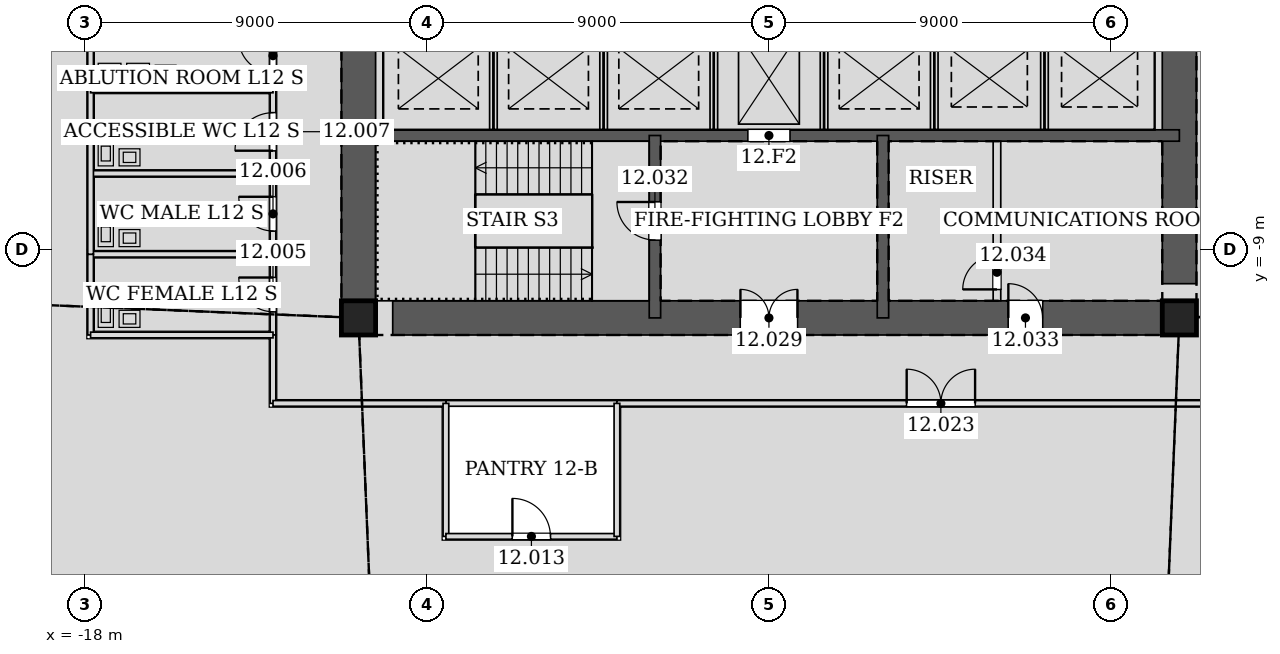
"""IFC4 building model, lengths in metres.
Left out: names, types, materials, properties, quantities, classifications, styles, units other than length and angle.
Written with IfcOpenShell. Run it as: python <this file> out.ifc"""

import sys

from ifc_helpers import new_model, si_unit, direction, frame, frame_2d, origin, origin_2d, place, context, subcontext, project, spatial, rectangle, hollow_rectangle, extrude, element, fill, save


model = new_model("IFC4")
c1 = context("Model", 3, precision=1e-05, world=origin(), true_north=direction((0.0, 1.0)))
c2 = subcontext(c1, "Body", "Model", "MODEL_VIEW")
j1 = project(units=[si_unit("LENGTHUNIT", "METRE"), si_unit("PLANEANGLEUNIT", "RADIAN")], contexts=[c1])
p1 = place(None, origin())
s1 = spatial("IfcSite", under=j1, at=p1, CompositionType="ELEMENT")
p2 = place(p1, origin())
s2 = spatial("IfcBuilding", under=s1, at=p2, CompositionType="ELEMENT")
p3 = place(p2, frame((0.0, 0.0, 58.2)))
s3 = spatial("IfcBuildingStorey", under=s2, at=p3, CompositionType="ELEMENT", Elevation=58.2)
for number, where, z_axis, x_axis in (
    (1, (-10.8, -10.8, 0.0), (0.0, 0.0, 1.0), (1.0, 0.0, 0.0)),
    (2, (10.8, -10.8, 0.0), (0.0, 0.0, 1.0), (1.0, 0.0, 0.0)),
):
    element("IfcColumn", number, at=place(p3, frame(where, z_axis=z_axis, x_axis=x_axis)), inside=s3, PredefinedType="COLUMN", context=c2, shape_type="SweptSolid", body=[
        extrude(hollow_rectangle(XDim=0.9, YDim=0.9, WallThickness=0.06, at=origin_2d()), origin(), (0.0, 0.0, 1.0), 4.2),
    ])
p4 = place(p3, frame((-10.8, -10.8, 0.0), z_axis=(0.0, 0.0, 1.0), x_axis=(1.0, 0.0, 0.0)))
e3 = element("IfcWall", 3, at=p4, inside=s3, PredefinedType="SOLIDWALL", context=c2, shape_type="SweptSolid", body=[
    extrude(rectangle(XDim=21.6, YDim=0.9, at=frame_2d((10.8, 0.0))), origin(), (0.0, 0.0, 1.0), 4.2),
])
p5 = place(p4, frame((10.05, 0.0, 0.0)))
e4 = element("IfcOpeningElement", 4, at=p5, cuts=e3, PredefinedType="OPENING", context=c2, shape_type="SweptSolid", body=[
    extrude(rectangle(XDim=1.5, YDim=2.1, at=frame_2d((0.75, 1.05))), frame((0.0, 0.46, 0.0), z_axis=(0.0, -1.0, 0.0), x_axis=(1.0, 0.0, 0.0)), (0.0, 0.0, 1.0), 0.92),
])
p6 = place(p4, frame((17.1, 0.0, 0.0)))
e5 = element("IfcOpeningElement", 5, at=p6, cuts=e3, PredefinedType="OPENING", context=c2, shape_type="SweptSolid", body=[
    extrude(rectangle(XDim=0.9, YDim=2.1, at=frame_2d((0.45, 1.05))), frame((0.0, 0.46, 0.0), z_axis=(0.0, -1.0, 0.0), x_axis=(1.0, 0.0, 0.0)), (0.0, 0.0, 1.0), 0.92),
])
p7 = place(p3, frame((10.8, -10.8, 0.0), z_axis=(0.0, 0.0, 1.0), x_axis=(0.0, 1.0, 0.0)))
e6 = element("IfcWall", 6, at=p7, inside=s3, PredefinedType="SOLIDWALL", context=c2, shape_type="SweptSolid", body=[
    extrude(rectangle(XDim=21.6, YDim=0.9, at=frame_2d((10.8, 0.0))), origin(), (0.0, 0.0, 1.0), 4.2),
])
p8 = place(p7, frame((11.7, 0.0, 0.0)))
e7 = element("IfcOpeningElement", 7, at=p8, cuts=e6, PredefinedType="OPENING", context=c2, shape_type="SweptSolid", body=[
    extrude(rectangle(XDim=1.2, YDim=2.1, at=frame_2d((0.6, 1.05))), frame((0.0, 0.46, 0.0), z_axis=(0.0, -1.0, 0.0), x_axis=(1.0, 0.0, 0.0)), (0.0, 0.0, 1.0), 0.92),
])
p9 = place(p7, frame((8.7, 0.0, 0.0)))
e8 = element("IfcOpeningElement", 8, at=p9, cuts=e6, PredefinedType="OPENING", context=c2, shape_type="SweptSolid", body=[
    extrude(rectangle(XDim=1.2, YDim=2.1, at=frame_2d((0.6, 1.05))), frame((0.0, 0.46, 0.0), z_axis=(0.0, -1.0, 0.0), x_axis=(1.0, 0.0, 0.0)), (0.0, 0.0, 1.0), 0.92),
])
p10 = place(p3, frame((-10.8, 10.8, 0.0), z_axis=(0.0, 0.0, 1.0), x_axis=(0.0, -1.0, 0.0)))
e9 = element("IfcWall", 9, at=p10, inside=s3, PredefinedType="SOLIDWALL", context=c2, shape_type="SweptSolid", body=[
    extrude(rectangle(XDim=21.6, YDim=0.9, at=frame_2d((10.8, 0.0))), origin(), (0.0, 0.0, 1.0), 4.2),
])
p11 = place(p10, frame((8.7, 0.0, 0.0)))
e10 = element("IfcOpeningElement", 10, at=p11, cuts=e9, PredefinedType="OPENING", context=c2, shape_type="SweptSolid", body=[
    extrude(rectangle(XDim=1.2, YDim=2.1, at=frame_2d((0.6, 1.05))), frame((0.0, 0.46, 0.0), z_axis=(0.0, -1.0, 0.0), x_axis=(1.0, 0.0, 0.0)), (0.0, 0.0, 1.0), 0.92),
])
p12 = place(p10, frame((11.7, 0.0, 0.0)))
e11 = element("IfcOpeningElement", 11, at=p12, cuts=e9, PredefinedType="OPENING", context=c2, shape_type="SweptSolid", body=[
    extrude(rectangle(XDim=1.2, YDim=2.1, at=frame_2d((0.6, 1.05))), frame((0.0, 0.46, 0.0), z_axis=(0.0, -1.0, 0.0), x_axis=(1.0, 0.0, 0.0)), (0.0, 0.0, 1.0), 0.92),
])
p13 = place(p3, frame((-10.8, -6.0, 0.0), z_axis=(0.0, 0.0, 1.0), x_axis=(1.0, 0.0, 0.0)))
e12 = element("IfcWall", 12, at=p13, inside=s3, PredefinedType="SOLIDWALL", context=c2, shape_type="SweptSolid", body=[
    extrude(rectangle(XDim=21.6, YDim=0.3, at=frame_2d((10.8, 0.0))), origin(), (0.0, 0.0, 1.0), 4.2),
])
p14 = place(p13, frame((10.25, 0.0, 0.0)))
e13 = element("IfcOpeningElement", 13, at=p14, cuts=e12, PredefinedType="OPENING", context=c2, shape_type="SweptSolid", body=[
    extrude(rectangle(XDim=1.1, YDim=2.1, at=frame_2d((0.55, 1.05))), frame((0.0, 0.16, 0.0), z_axis=(0.0, -1.0, 0.0), x_axis=(1.0, 0.0, 0.0)), (0.0, 0.0, 1.0), 0.32),
])
p15 = place(p3, frame((-3.0, -6.0, 0.0), z_axis=(0.0, 0.0, 1.0), x_axis=(0.0, -1.0, 0.0)))
e14 = element("IfcWall", 14, at=p15, inside=s3, PredefinedType="SOLIDWALL", context=c2, shape_type="SweptSolid", body=[
    extrude(rectangle(XDim=4.8, YDim=0.3, at=frame_2d((2.4, 0.0))), origin(), (0.0, 0.0, 1.0), 4.2),
])
p16 = place(p15, frame((1.75, 0.0, 0.0)))
e15 = element("IfcOpeningElement", 15, at=p16, cuts=e14, PredefinedType="OPENING", context=c2, shape_type="SweptSolid", body=[
    extrude(rectangle(XDim=1.0, YDim=2.1, at=frame_2d((0.5, 1.05))), frame((0.0, 0.16, 0.0), z_axis=(0.0, -1.0, 0.0), x_axis=(1.0, 0.0, 0.0)), (0.0, 0.0, 1.0), 0.32),
])
p17 = place(p3, frame((3.0, -6.0, 0.0), z_axis=(0.0, 0.0, 1.0), x_axis=(0.0, -1.0, 0.0)))
e16 = element("IfcWall", 16, at=p17, inside=s3, PredefinedType="SOLIDWALL", context=c2, shape_type="SweptSolid", body=[
    extrude(rectangle(XDim=4.8, YDim=0.3, at=frame_2d((2.4, 0.0))), origin(), (0.0, 0.0, 1.0), 4.2),
])
p18 = place(p3, frame((-13.05, -9.124, 0.0), z_axis=(0.0, 0.0, 1.0), x_axis=(0.0, -1.0, 0.0)))
e17 = element("IfcWall", 17, at=p18, inside=s3, PredefinedType="PARTITIONING", context=c2, shape_type="SweptSolid", body=[
    extrude(rectangle(XDim=2.127, YDim=0.15, at=frame_2d((1.063, 0.0))), origin(), (0.0, 0.0, 1.0), 3.014),
])
p19 = place(p18, frame((0.614, 0.0, 0.0)))
e18 = element("IfcOpeningElement", 18, at=p19, cuts=e17, PredefinedType="OPENING", context=c2, shape_type="SweptSolid", body=[
    extrude(rectangle(XDim=0.9, YDim=2.1, at=frame_2d((0.45, 1.05))), frame((0.0, 0.085, 0.0), z_axis=(0.0, -1.0, 0.0), x_axis=(1.0, 0.0, 0.0)), (0.0, 0.0, 1.0), 0.17),
])
p20 = place(p3, frame((-13.05, -6.999, 0.0), z_axis=(0.0, 0.0, 1.0), x_axis=(0.0, -1.0, 0.0)))
e19 = element("IfcWall", 19, at=p20, inside=s3, PredefinedType="PARTITIONING", context=c2, shape_type="SweptSolid", body=[
    extrude(rectangle(XDim=2.127, YDim=0.15, at=frame_2d((1.063, 0.0))), origin(), (0.0, 0.0, 1.0), 4.035),
])
p21 = place(p20, frame((0.614, 0.0, 0.0)))
e20 = element("IfcOpeningElement", 20, at=p21, cuts=e19, PredefinedType="OPENING", context=c2, shape_type="SweptSolid", body=[
    extrude(rectangle(XDim=0.9, YDim=2.1, at=frame_2d((0.45, 1.05))), frame((0.0, 0.085, 0.0), z_axis=(0.0, -1.0, 0.0), x_axis=(1.0, 0.0, 0.0)), (0.0, 0.0, 1.0), 0.17),
])
p22 = place(p3, frame((-13.05, -4.799, 0.0), z_axis=(0.0, 0.0, 1.0), x_axis=(0.0, -1.0, 0.0)))
e21 = element("IfcWall", 21, at=p22, inside=s3, PredefinedType="PARTITIONING", context=c2, shape_type="SweptSolid", body=[
    extrude(rectangle(XDim=2.202, YDim=0.15, at=frame_2d((1.101, 0.0))), origin(), (0.0, 0.0, 1.0), 4.035),
])
p23 = place(p22, frame((0.601, 0.0, 0.0)))
e22 = element("IfcOpeningElement", 22, at=p23, cuts=e21, PredefinedType="OPENING", context=c2, shape_type="SweptSolid", body=[
    extrude(rectangle(XDim=1.0, YDim=2.1, at=frame_2d((0.5, 1.05))), frame((0.0, 0.085, 0.0), z_axis=(0.0, -1.0, 0.0), x_axis=(1.0, 0.0, 0.0)), (0.0, 0.0, 1.0), 0.17),
])
p24 = place(p3, frame((-13.05, -2.999, 0.0), z_axis=(0.0, 0.0, 1.0), x_axis=(0.0, -1.0, 0.0)))
e23 = element("IfcWall", 23, at=p24, inside=s3, PredefinedType="PARTITIONING", context=c2, shape_type="SweptSolid", body=[
    extrude(rectangle(XDim=1.802, YDim=0.15, at=frame_2d((0.901, 0.0))), origin(), (0.0, 0.0, 1.0), 4.035),
])
p25 = place(p24, frame((0.451, 0.0, 0.0)))
e24 = element("IfcOpeningElement", 24, at=p25, cuts=e23, PredefinedType="OPENING", context=c2, shape_type="SweptSolid", body=[
    extrude(rectangle(XDim=0.9, YDim=2.1, at=frame_2d((0.45, 1.05))), frame((0.0, 0.085, 0.0), z_axis=(0.0, -1.0, 0.0), x_axis=(1.0, 0.0, 0.0)), (0.0, 0.0, 1.0), 0.17),
])
p26 = place(p3, frame((-8.501, -13.05, 0.0), z_axis=(0.0, 0.0, 1.0), x_axis=(1.0, 0.0, 0.0)))
e25 = element("IfcWall", 25, at=p26, inside=s3, PredefinedType="PARTITIONING", context=c2, shape_type="SweptSolid", body=[
    extrude(rectangle(XDim=4.502, YDim=0.15, at=frame_2d((2.251, 0.0))), origin(), (0.0, 0.0, 1.0), 4.035),
])
p27 = place(p3, frame((-13.05, -11.249, 0.0), z_axis=(0.0, 0.0, 1.0), x_axis=(0.0, -1.0, 0.0)))
e26 = element("IfcWall", 26, at=p27, inside=s3, PredefinedType="PARTITIONING", context=c2, shape_type="SweptSolid", body=[
    extrude(rectangle(XDim=1.801, YDim=0.15, at=frame_2d((0.9, 0.0))), origin(), (0.0, 0.0, 1.0), 3.167),
])
p28 = place(p3, frame((-13.05, -13.05, 0.0), z_axis=(0.0, 0.0, 1.0), x_axis=(1.0, 0.0, 0.0)))
e27 = element("IfcWall", 27, at=p28, inside=s3, PredefinedType="PARTITIONING", context=c2, shape_type="SweptSolid", body=[
    extrude(rectangle(XDim=4.551, YDim=0.15, at=frame_2d((2.275, 0.0))), origin(), (0.0, 0.0, 1.0), 3.014),
])
p29 = place(p3, frame((-4.001, -13.05, 0.0), z_axis=(0.0, 0.0, 1.0), x_axis=(1.0, 0.0, 0.0)))
e28 = element("IfcWall", 28, at=p29, inside=s3, PredefinedType="PARTITIONING", context=c2, shape_type="SweptSolid", body=[
    extrude(rectangle(XDim=17.051, YDim=0.15, at=frame_2d((8.525, 0.0))), origin(), (0.0, 0.0, 1.0), 2.984),
])
p30 = place(p29, frame((7.625, 0.0, 0.0)))
e29 = element("IfcOpeningElement", 29, at=p30, cuts=e28, PredefinedType="OPENING", context=c2, shape_type="SweptSolid", body=[
    extrude(rectangle(XDim=1.8, YDim=2.4, at=frame_2d((0.9, 1.2))), frame((0.0, 0.085, 0.0), z_axis=(0.0, -1.0, 0.0), x_axis=(1.0, 0.0, 0.0)), (0.0, 0.0, 1.0), 0.17),
])
p31 = place(p3, frame((-13.05, -9.125, 0.0), z_axis=(0.0, 0.0, 1.0), x_axis=(-1.0, 0.0, 0.0)))
e30 = element("IfcWall", 30, at=p31, inside=s3, PredefinedType="PARTITIONING", context=c2, shape_type="SweptSolid", body=[
    extrude(rectangle(XDim=4.8, YDim=0.15, at=frame_2d((2.4, 0.0))), origin(), (0.0, 0.0, 1.0), 3.423),
])
p32 = place(p3, frame((-17.85, -9.125, 0.0), z_axis=(0.0, 0.0, 1.0), x_axis=(0.0, -1.0, 0.0)))
e31 = element("IfcWall", 31, at=p32, inside=s3, PredefinedType="PARTITIONING", context=c2, shape_type="SweptSolid", body=[
    extrude(rectangle(XDim=2.125, YDim=0.15, at=frame_2d((1.062, 0.0))), origin(), (0.0, 0.0, 1.0), 3.014),
])
p33 = place(p3, frame((-17.85, -11.25, 0.0), z_axis=(0.0, 0.0, 1.0), x_axis=(1.0, 0.0, 0.0)))
e32 = element("IfcWall", 32, at=p33, inside=s3, PredefinedType="PARTITIONING", context=c2, shape_type="SweptSolid", body=[
    extrude(rectangle(XDim=4.8, YDim=0.15, at=frame_2d((2.4, 0.0))), origin(), (0.0, 0.0, 1.0), 3.715),
])
p34 = place(p3, frame((-13.05, -7.0, 0.0), z_axis=(0.0, 0.0, 1.0), x_axis=(-1.0, 0.0, 0.0)))
e33 = element("IfcWall", 33, at=p34, inside=s3, PredefinedType="PARTITIONING", context=c2, shape_type="SweptSolid", body=[
    extrude(rectangle(XDim=4.8, YDim=0.15, at=frame_2d((2.4, 0.0))), origin(), (0.0, 0.0, 1.0), 3.423),
])
p35 = place(p3, frame((-17.85, -9.125, 0.0), z_axis=(0.0, 0.0, 1.0), x_axis=(0.0, 1.0, 0.0)))
e34 = element("IfcWall", 34, at=p35, inside=s3, PredefinedType="PARTITIONING", context=c2, shape_type="SweptSolid", body=[
    extrude(rectangle(XDim=6.125, YDim=0.15, at=frame_2d((3.062, 0.0))), origin(), (0.0, 0.0, 1.0), 4.035),
])
p36 = place(p3, frame((-13.05, -4.8, 0.0), z_axis=(0.0, 0.0, 1.0), x_axis=(-1.0, 0.0, 0.0)))
e35 = element("IfcWall", 35, at=p36, inside=s3, PredefinedType="PARTITIONING", context=c2, shape_type="SweptSolid", body=[
    extrude(rectangle(XDim=4.8, YDim=0.15, at=frame_2d((2.4, 0.0))), origin(), (0.0, 0.0, 1.0), 3.423),
])
p37 = place(p3, frame((-8.5, -13.05, 0.0), z_axis=(0.0, 0.0, 1.0), x_axis=(0.0, -1.0, 0.0)))
e36 = element("IfcWall", 36, at=p37, inside=s3, PredefinedType="PARTITIONING", context=c2, shape_type="SweptSolid", body=[
    extrude(rectangle(XDim=3.5, YDim=0.15, at=frame_2d((1.75, 0.0))), origin(), (0.0, 0.0, 1.0), 3.423),
])
p38 = place(p3, frame((-8.5, -16.55, 0.0), z_axis=(0.0, 0.0, 1.0), x_axis=(1.0, 0.0, 0.0)))
e37 = element("IfcWall", 37, at=p38, inside=s3, PredefinedType="PARTITIONING", context=c2, shape_type="SweptSolid", body=[
    extrude(rectangle(XDim=4.5, YDim=0.15, at=frame_2d((2.25, 0.0))), origin(), (0.0, 0.0, 1.0), 3.565),
])
p39 = place(p38, frame((1.75, 0.0, 0.0)))
e38 = element("IfcOpeningElement", 38, at=p39, cuts=e37, PredefinedType="OPENING", context=c2, shape_type="SweptSolid", body=[
    extrude(rectangle(XDim=1.0, YDim=2.1, at=frame_2d((0.5, 1.05))), frame((0.0, 0.085, 0.0), z_axis=(0.0, -1.0, 0.0), x_axis=(1.0, 0.0, 0.0)), (0.0, 0.0, 1.0), 0.17),
])
p40 = place(p3, frame((-4.0, -16.55, 0.0), z_axis=(0.0, 0.0, 1.0), x_axis=(0.0, 1.0, 0.0)))
e39 = element("IfcWall", 39, at=p40, inside=s3, PredefinedType="PARTITIONING", context=c2, shape_type="SweptSolid", body=[
    extrude(rectangle(XDim=3.5, YDim=0.15, at=frame_2d((1.75, 0.0))), origin(), (0.0, 0.0, 1.0), 3.423),
])
for number, where, z_axis, x_axis in (
    (40, (-7.25, -5.85, 0.0), (0.0, 0.0, 1.0), (0.0, 1.0, 0.0)),
    (41, (-4.35, -5.85, 0.0), (0.0, 0.0, 1.0), (0.0, 1.0, 0.0)),
    (42, (-1.45, -5.85, 0.0), (0.0, 0.0, 1.0), (0.0, 1.0, 0.0)),
    (43, (1.45, -5.85, 0.0), (0.0, 0.0, 1.0), (0.0, 1.0, 0.0)),
    (44, (4.35, -5.85, 0.0), (0.0, 0.0, 1.0), (0.0, 1.0, 0.0)),
    (45, (7.25, -5.85, 0.0), (0.0, 0.0, 1.0), (0.0, 1.0, 0.0)),
):
    element("IfcWall", number, at=place(p3, frame(where, z_axis=z_axis, x_axis=x_axis)), inside=s3, PredefinedType="PARTITIONING", context=c2, shape_type="SweptSolid", body=[
        extrude(rectangle(XDim=2.7, YDim=0.2, at=frame_2d((1.35, 0.0))), origin(), (0.0, 0.0, 1.0), 4.2),
    ])
p41 = place(p3, frame((6.0, -10.35, 0.0), z_axis=(0.0, 0.0, 1.0), x_axis=(0.0, 1.0, 0.0)))
e46 = element("IfcWall", 46, at=p41, inside=s3, PredefinedType="PARTITIONING", context=c2, shape_type="SweptSolid", body=[
    extrude(rectangle(XDim=4.2, YDim=0.2, at=frame_2d((2.1, 0.0))), origin(), (0.0, 0.0, 1.0), 4.035),
])
p42 = place(p41, frame((0.3, 0.0, 0.0)))
e47 = element("IfcOpeningElement", 47, at=p42, cuts=e46, PredefinedType="OPENING", context=c2, shape_type="SweptSolid", body=[
    extrude(rectangle(XDim=0.9, YDim=2.1, at=frame_2d((0.45, 1.05))), frame((0.0, 0.11, 0.0), z_axis=(0.0, -1.0, 0.0), x_axis=(1.0, 0.0, 0.0)), (0.0, 0.0, 1.0), 0.22),
])
p43 = place(p19, frame((0.9, 0.0, 0.0), z_axis=(0.0, 0.0, 1.0), x_axis=(-1.0, 0.0, 0.0)))
e48 = element("IfcDoor", 48, at=p43, inside=s3, OperationType="SINGLE_SWING_RIGHT", PredefinedType="DOOR", context=c2, shape_type="SweptSolid", body=[
    extrude(rectangle(XDim=0.9, YDim=2.1, at=frame_2d((0.45, 1.05))), frame((0.0, 0.025, 0.0), z_axis=(0.0, -1.0, 0.0), x_axis=(1.0, 0.0, 0.0)), (0.0, 0.0, 1.0), 0.05),
])
fill(e18, e48)
p44 = place(p21, frame((0.9, 0.0, 0.0), z_axis=(0.0, 0.0, 1.0), x_axis=(-1.0, 0.0, 0.0)))
e49 = element("IfcDoor", 49, at=p44, inside=s3, OperationType="SINGLE_SWING_RIGHT", PredefinedType="DOOR", context=c2, shape_type="SweptSolid", body=[
    extrude(rectangle(XDim=0.9, YDim=2.1, at=frame_2d((0.45, 1.05))), frame((0.0, 0.025, 0.0), z_axis=(0.0, -1.0, 0.0), x_axis=(1.0, 0.0, 0.0)), (0.0, 0.0, 1.0), 0.05),
])
fill(e20, e49)
p45 = place(p23, frame((1.0, 0.0, 0.0), z_axis=(0.0, 0.0, 1.0), x_axis=(-1.0, 0.0, 0.0)))
e50 = element("IfcDoor", 50, at=p45, inside=s3, OperationType="SINGLE_SWING_LEFT", PredefinedType="DOOR", context=c2, shape_type="SweptSolid", body=[
    extrude(rectangle(XDim=1.0, YDim=2.1, at=frame_2d((0.5, 1.05))), frame((0.0, 0.025, 0.0), z_axis=(0.0, -1.0, 0.0), x_axis=(1.0, 0.0, 0.0)), (0.0, 0.0, 1.0), 0.05),
])
fill(e22, e50)
p46 = place(p25, frame((0.9, 0.0, 0.0), z_axis=(0.0, 0.0, 1.0), x_axis=(-1.0, 0.0, 0.0)))
e51 = element("IfcDoor", 51, at=p46, inside=s3, OperationType="SINGLE_SWING_RIGHT", PredefinedType="DOOR", context=c2, shape_type="SweptSolid", body=[
    extrude(rectangle(XDim=0.9, YDim=2.1, at=frame_2d((0.45, 1.05))), frame((0.0, 0.025, 0.0), z_axis=(0.0, -1.0, 0.0), x_axis=(1.0, 0.0, 0.0)), (0.0, 0.0, 1.0), 0.05),
])
fill(e24, e51)
p47 = place(p39, origin())
e52 = element("IfcDoor", 52, at=p47, inside=s3, OperationType="SINGLE_SWING_LEFT", PredefinedType="DOOR", context=c2, shape_type="SweptSolid", body=[
    extrude(rectangle(XDim=1.0, YDim=2.1, at=frame_2d((0.5, 1.05))), frame((0.0, 0.025, 0.0), z_axis=(0.0, -1.0, 0.0), x_axis=(1.0, 0.0, 0.0)), (0.0, 0.0, 1.0), 0.05),
])
fill(e38, e52)
p48 = place(p30, origin())
e53 = element("IfcDoor", 53, at=p48, inside=s3, OperationType="DOUBLE_DOOR_SINGLE_SWING", PredefinedType="DOOR", context=c2, shape_type="SweptSolid", body=[
    extrude(rectangle(XDim=1.8, YDim=2.4, at=frame_2d((0.9, 1.2))), frame((0.0, 0.025, 0.0), z_axis=(0.0, -1.0, 0.0), x_axis=(1.0, 0.0, 0.0)), (0.0, 0.0, 1.0), 0.05),
])
fill(e29, e53)
p49 = place(p5, origin())
e54 = element("IfcDoor", 54, at=p49, inside=s3, OperationType="DOUBLE_DOOR_SINGLE_SWING", PredefinedType="DOOR", context=c2, shape_type="SweptSolid", body=[
    extrude(rectangle(XDim=1.5, YDim=2.1, at=frame_2d((0.75, 1.05))), frame((0.0, 0.025, 0.0), z_axis=(0.0, -1.0, 0.0), x_axis=(1.0, 0.0, 0.0)), (0.0, 0.0, 1.0), 0.05),
])
fill(e4, e54)
p50 = place(p16, frame((1.0, 0.0, 0.0), z_axis=(0.0, 0.0, 1.0), x_axis=(-1.0, 0.0, 0.0)))
e55 = element("IfcDoor", 55, at=p50, inside=s3, OperationType="SINGLE_SWING_RIGHT", PredefinedType="DOOR", context=c2, shape_type="SweptSolid", body=[
    extrude(rectangle(XDim=1.0, YDim=2.1, at=frame_2d((0.5, 1.05))), frame((0.0, 0.025, 0.0), z_axis=(0.0, -1.0, 0.0), x_axis=(1.0, 0.0, 0.0)), (0.0, 0.0, 1.0), 0.05),
])
fill(e15, e55)
p51 = place(p6, origin())
e56 = element("IfcDoor", 56, at=p51, inside=s3, OperationType="SINGLE_SWING_LEFT", PredefinedType="DOOR", context=c2, shape_type="SweptSolid", body=[
    extrude(rectangle(XDim=0.9, YDim=2.1, at=frame_2d((0.45, 1.05))), frame((0.0, 0.025, 0.0), z_axis=(0.0, -1.0, 0.0), x_axis=(1.0, 0.0, 0.0)), (0.0, 0.0, 1.0), 0.05),
])
fill(e5, e56)
p52 = place(p42, origin())
e57 = element("IfcDoor", 57, at=p52, inside=s3, OperationType="SINGLE_SWING_LEFT", PredefinedType="DOOR", context=c2, shape_type="SweptSolid", body=[
    extrude(rectangle(XDim=0.9, YDim=2.1, at=frame_2d((0.45, 1.05))), frame((0.0, 0.025, 0.0), z_axis=(0.0, -1.0, 0.0), x_axis=(1.0, 0.0, 0.0)), (0.0, 0.0, 1.0), 0.05),
])
fill(e47, e57)
p53 = place(p14, origin())
e58 = element("IfcDoor", 58, at=p53, inside=s3, OperationType="DOUBLE_DOOR_SLIDING", PredefinedType="DOOR", context=c2, shape_type="SweptSolid", body=[
    extrude(rectangle(XDim=1.1, YDim=2.1, at=frame_2d((0.55, 1.05))), frame((0.0, 0.025, 0.0), z_axis=(0.0, -1.0, 0.0), x_axis=(1.0, 0.0, 0.0)), (0.0, 0.0, 1.0), 0.05),
])
fill(e13, e58)
save(model, sys.argv[1])
